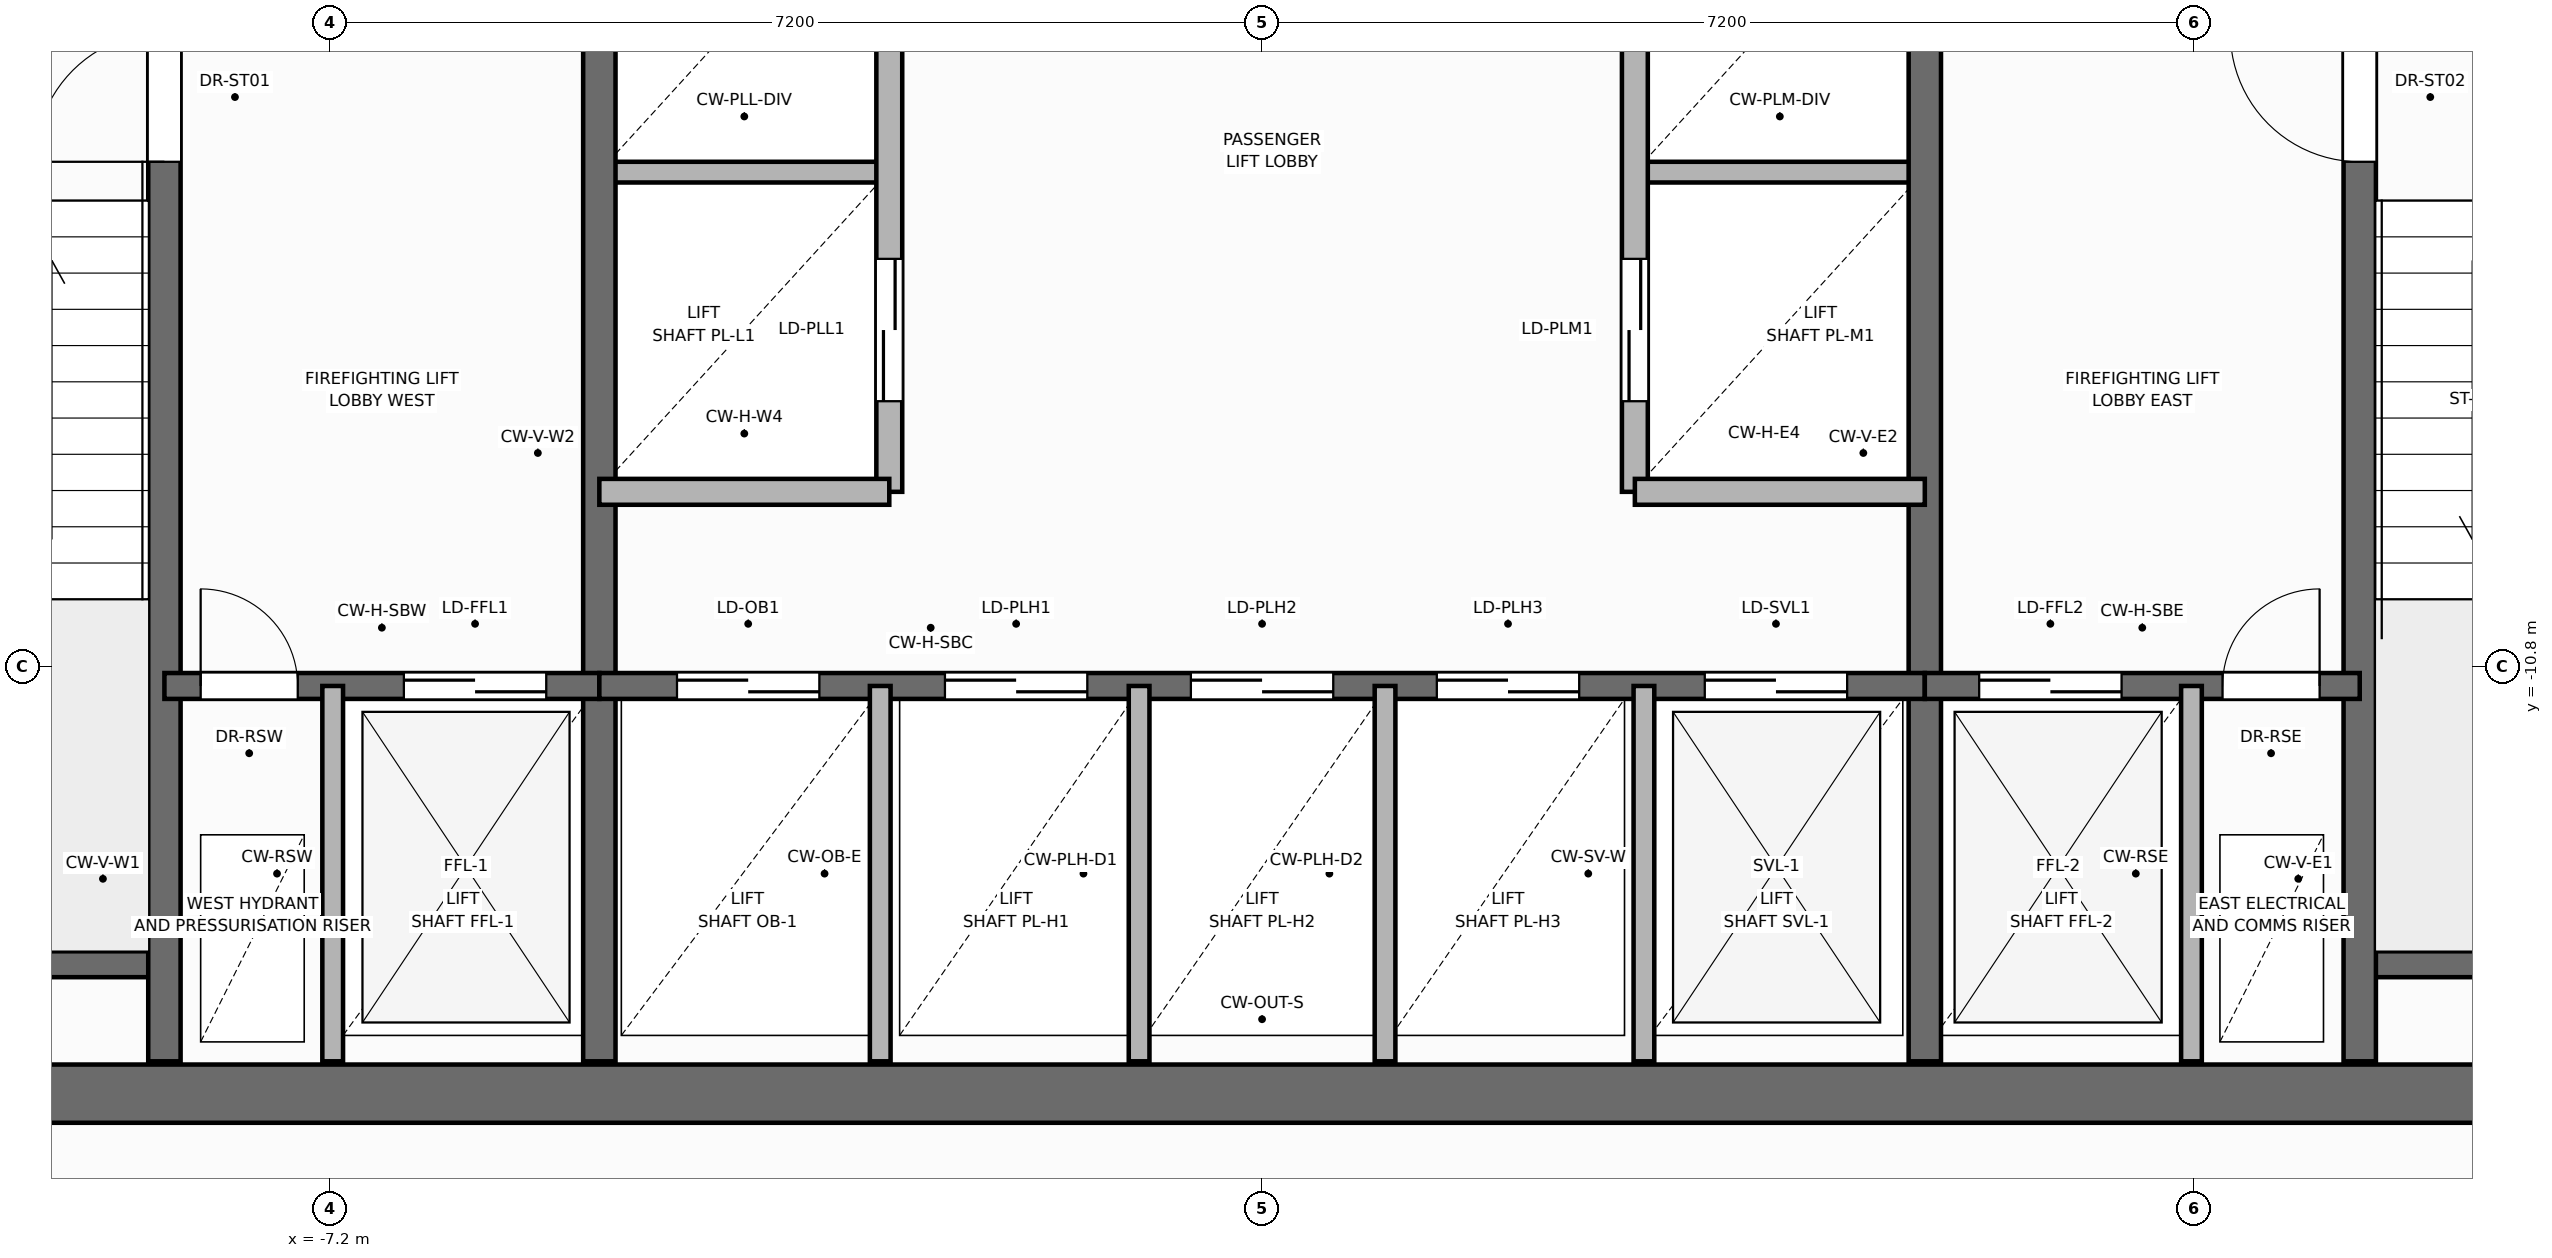
"""IFC4 building model, lengths in metres.
Left out: names, types, materials, properties, quantities, classifications, styles, units other than length and angle.
Written with IfcOpenShell. Run it as: python <this file> out.ifc"""

import sys

from ifc_helpers import new_model, si_unit, direction, frame, frame_2d, origin, place, context, subcontext, project, spatial, rectangle, extrude, element, fill, save


model = new_model("IFC4")
c1 = context("Model", 3, precision=1e-05, world=origin(), true_north=direction((0.0, 1.0)))
c2 = subcontext(c1, "Body", "Model", "MODEL_VIEW")
j1 = project(units=[si_unit("LENGTHUNIT", "METRE"), si_unit("PLANEANGLEUNIT", "RADIAN")], contexts=[c1])
p1 = place(None, origin())
s1 = spatial("IfcSite", under=j1, at=p1, CompositionType="ELEMENT")
p2 = place(p1, origin())
s2 = spatial("IfcBuilding", under=s1, at=p2, CompositionType="ELEMENT")
p3 = place(p2, frame((0.0, 0.0, 9.9)))
s3 = spatial("IfcBuildingStorey", under=s2, at=p3, CompositionType="ELEMENT", Elevation=9.9)
for number, where, z_axis, x_axis in (
    (1, (-5.12, -6.98, 0.0), (0.0, 0.0, 1.0), (1.0, 0.0, 0.0)),
    (2, (2.88, -6.98, 0.0), (0.0, 0.0, 1.0), (1.0, 0.0, 0.0)),
):
    element("IfcWall", number, at=place(p3, frame(where, z_axis=z_axis, x_axis=x_axis)), inside=s3, PredefinedType="PARTITIONING", context=c2, shape_type="SweptSolid", body=[
        extrude(rectangle(XDim=2.24, YDim=0.16, at=frame_2d((1.12, 0.0))), origin(), (0.0, 0.0, 1.0), 4.22),
    ])
p4 = place(p3, frame((-12.65, -14.1, 0.0), z_axis=(0.0, 0.0, 1.0), x_axis=(1.0, 0.0, 0.0)))
e3 = element("IfcWall", 3, at=p4, inside=s3, PredefinedType="SHEAR", context=c2, shape_type="SweptSolid", body=[
    extrude(rectangle(XDim=25.3, YDim=0.45, at=frame_2d((12.65, 0.0))), origin(), (0.0, 0.0, 1.0), 4.5),
])
for number, where, z_axis, x_axis in (
    (4, (-12.35, -13.1, 0.0), (0.0, 0.0, 1.0), (1.0, 0.0, 0.0)),
    (5, (8.48, -13.1, 0.0), (0.0, 0.0, 1.0), (1.0, 0.0, 0.0)),
):
    element("IfcWall", number, at=place(p3, frame(where, z_axis=z_axis, x_axis=x_axis)), inside=s3, PredefinedType="SOLIDWALL", context=c2, shape_type="SweptSolid", body=[
        extrude(rectangle(XDim=3.87, YDim=0.2, at=frame_2d((1.935, 0.0))), origin(), (0.0, 0.0, 1.0), 4.5),
    ])
p5 = place(p3, frame((-8.48, -13.85, 0.0), z_axis=(0.0, 0.0, 1.0), x_axis=(0.0, 1.0, 0.0)))
e6 = element("IfcWall", 6, at=p5, inside=s3, PredefinedType="SHEAR", context=c2, shape_type="SweptSolid", body=[
    extrude(rectangle(XDim=9.4, YDim=0.25, at=frame_2d((4.7, 0.0))), origin(), (0.0, 0.0, 1.0), 4.5),
])
p6 = place(p5, frame((6.95, 0.0, 0.0)))
e7 = element("IfcOpeningElement", 7, at=p6, cuts=e6, PredefinedType="OPENING", context=c2, shape_type="SweptSolid", body=[
    extrude(rectangle(XDim=1.006, YDim=2.104, at=frame_2d((0.5, 1.052))), frame((0.0, 0.135, 0.0), z_axis=(0.0, -1.0, 0.0), x_axis=(1.0, 0.0, 0.0)), (0.0, 0.0, 1.0), 0.27),
])
p7 = place(p3, frame((8.48, -13.85, 0.0), z_axis=(0.0, 0.0, 1.0), x_axis=(0.0, 1.0, 0.0)))
e8 = element("IfcWall", 8, at=p7, inside=s3, PredefinedType="SHEAR", context=c2, shape_type="SweptSolid", body=[
    extrude(rectangle(XDim=9.4, YDim=0.25, at=frame_2d((4.7, 0.0))), origin(), (0.0, 0.0, 1.0), 4.5),
])
p8 = place(p7, frame((6.95, 0.0, 0.0)))
e9 = element("IfcOpeningElement", 9, at=p8, cuts=e8, PredefinedType="OPENING", context=c2, shape_type="SweptSolid", body=[
    extrude(rectangle(XDim=1.006, YDim=2.104, at=frame_2d((0.5, 1.052))), frame((0.0, 0.135, 0.0), z_axis=(0.0, -1.0, 0.0), x_axis=(1.0, 0.0, 0.0)), (0.0, 0.0, 1.0), 0.27),
])
for number, where, z_axis, x_axis in (
    (10, (-5.12, -13.85, 0.0), (0.0, 0.0, 1.0), (0.0, 1.0, 0.0)),
    (11, (5.12, -13.85, 0.0), (0.0, 0.0, 1.0), (0.0, 1.0, 0.0)),
):
    element("IfcWall", number, at=place(p3, frame(where, z_axis=z_axis, x_axis=x_axis)), inside=s3, PredefinedType="SHEAR", context=c2, shape_type="SweptSolid", body=[
        extrude(rectangle(XDim=9.4, YDim=0.25, at=frame_2d((4.7, 0.0))), origin(), (0.0, 0.0, 1.0), 4.5),
    ])
p9 = place(p3, frame((-8.48, -10.95, 0.0), z_axis=(0.0, 0.0, 1.0), x_axis=(1.0, 0.0, 0.0)))
e12 = element("IfcWall", 12, at=p9, inside=s3, PredefinedType="SOLIDWALL", context=c2, shape_type="SweptSolid", body=[
    extrude(rectangle(XDim=3.36, YDim=0.2, at=frame_2d((1.68, 0.0))), origin(), (0.0, 0.0, 1.0), 4.5),
])
p10 = place(p9, frame((0.28, 0.0, 0.0)))
e13 = element("IfcOpeningElement", 13, at=p10, cuts=e12, PredefinedType="OPENING", context=c2, shape_type="SweptSolid", body=[
    extrude(rectangle(XDim=0.756, YDim=2.054, at=frame_2d((0.375, 1.027))), frame((0.0, 0.11, 0.0), z_axis=(0.0, -1.0, 0.0), x_axis=(1.0, 0.0, 0.0)), (0.0, 0.0, 1.0), 0.22),
])
p11 = place(p9, frame((1.85, 0.0, 0.0)))
e14 = element("IfcOpeningElement", 14, at=p11, cuts=e12, PredefinedType="OPENING", context=c2, shape_type="SweptSolid", body=[
    extrude(rectangle(XDim=1.106, YDim=2.104, at=frame_2d((0.55, 1.052))), frame((0.0, 0.11, 0.0), z_axis=(0.0, -1.0, 0.0), x_axis=(1.0, 0.0, 0.0)), (0.0, 0.0, 1.0), 0.22),
])
p12 = place(p3, frame((-5.12, -10.95, 0.0), z_axis=(0.0, 0.0, 1.0), x_axis=(1.0, 0.0, 0.0)))
e15 = element("IfcWall", 15, at=p12, inside=s3, PredefinedType="SOLIDWALL", context=c2, shape_type="SweptSolid", body=[
    extrude(rectangle(XDim=10.24, YDim=0.2, at=frame_2d((5.12, 0.0))), origin(), (0.0, 0.0, 1.0), 4.5),
])
p13 = place(p12, frame((0.6, 0.0, 0.0)))
e16 = element("IfcOpeningElement", 16, at=p13, cuts=e15, PredefinedType="OPENING", context=c2, shape_type="SweptSolid", body=[
    extrude(rectangle(XDim=1.106, YDim=2.104, at=frame_2d((0.55, 1.052))), frame((0.0, 0.11, 0.0), z_axis=(0.0, -1.0, 0.0), x_axis=(1.0, 0.0, 0.0)), (0.0, 0.0, 1.0), 0.22),
])
p14 = place(p12, frame((2.67, 0.0, 0.0)))
e17 = element("IfcOpeningElement", 17, at=p14, cuts=e15, PredefinedType="OPENING", context=c2, shape_type="SweptSolid", body=[
    extrude(rectangle(XDim=1.106, YDim=2.104, at=frame_2d((0.55, 1.052))), frame((0.0, 0.11, 0.0), z_axis=(0.0, -1.0, 0.0), x_axis=(1.0, 0.0, 0.0)), (0.0, 0.0, 1.0), 0.22),
])
p15 = place(p12, frame((4.57, 0.0, 0.0)))
e18 = element("IfcOpeningElement", 18, at=p15, cuts=e15, PredefinedType="OPENING", context=c2, shape_type="SweptSolid", body=[
    extrude(rectangle(XDim=1.106, YDim=2.104, at=frame_2d((0.55, 1.052))), frame((0.0, 0.11, 0.0), z_axis=(0.0, -1.0, 0.0), x_axis=(1.0, 0.0, 0.0)), (0.0, 0.0, 1.0), 0.22),
])
p16 = place(p12, frame((6.47, 0.0, 0.0)))
e19 = element("IfcOpeningElement", 19, at=p16, cuts=e15, PredefinedType="OPENING", context=c2, shape_type="SweptSolid", body=[
    extrude(rectangle(XDim=1.106, YDim=2.104, at=frame_2d((0.55, 1.052))), frame((0.0, 0.11, 0.0), z_axis=(0.0, -1.0, 0.0), x_axis=(1.0, 0.0, 0.0)), (0.0, 0.0, 1.0), 0.22),
])
p17 = place(p12, frame((8.54, 0.0, 0.0)))
e20 = element("IfcOpeningElement", 20, at=p17, cuts=e15, PredefinedType="OPENING", context=c2, shape_type="SweptSolid", body=[
    extrude(rectangle(XDim=1.106, YDim=2.104, at=frame_2d((0.55, 1.052))), frame((0.0, 0.11, 0.0), z_axis=(0.0, -1.0, 0.0), x_axis=(1.0, 0.0, 0.0)), (0.0, 0.0, 1.0), 0.22),
])
p18 = place(p3, frame((5.12, -10.95, 0.0), z_axis=(0.0, 0.0, 1.0), x_axis=(1.0, 0.0, 0.0)))
e21 = element("IfcWall", 21, at=p18, inside=s3, PredefinedType="SOLIDWALL", context=c2, shape_type="SweptSolid", body=[
    extrude(rectangle(XDim=3.36, YDim=0.2, at=frame_2d((1.68, 0.0))), origin(), (0.0, 0.0, 1.0), 4.5),
])
p19 = place(p18, frame((0.42, 0.0, 0.0)))
e22 = element("IfcOpeningElement", 22, at=p19, cuts=e21, PredefinedType="OPENING", context=c2, shape_type="SweptSolid", body=[
    extrude(rectangle(XDim=1.106, YDim=2.104, at=frame_2d((0.55, 1.052))), frame((0.0, 0.11, 0.0), z_axis=(0.0, -1.0, 0.0), x_axis=(1.0, 0.0, 0.0)), (0.0, 0.0, 1.0), 0.22),
])
p20 = place(p18, frame((2.3, 0.0, 0.0)))
e23 = element("IfcOpeningElement", 23, at=p20, cuts=e21, PredefinedType="OPENING", context=c2, shape_type="SweptSolid", body=[
    extrude(rectangle(XDim=0.756, YDim=2.054, at=frame_2d((0.375, 1.027))), frame((0.0, 0.11, 0.0), z_axis=(0.0, -1.0, 0.0), x_axis=(1.0, 0.0, 0.0)), (0.0, 0.0, 1.0), 0.22),
])
for number, where, z_axis, x_axis in (
    (24, (-7.18, -13.85, 0.0), (0.0, 0.0, 1.0), (0.0, 1.0, 0.0)),
    (25, (7.18, -13.85, 0.0), (0.0, 0.0, 1.0), (0.0, 1.0, 0.0)),
    (26, (-2.95, -13.85, 0.0), (0.0, 0.0, 1.0), (0.0, 1.0, 0.0)),
    (27, (2.95, -13.85, 0.0), (0.0, 0.0, 1.0), (0.0, 1.0, 0.0)),
):
    element("IfcWall", number, at=place(p3, frame(where, z_axis=z_axis, x_axis=x_axis)), inside=s3, PredefinedType="PARTITIONING", context=c2, shape_type="SweptSolid", body=[
        extrude(rectangle(XDim=2.9, YDim=0.16, at=frame_2d((1.45, 0.0))), origin(), (0.0, 0.0, 1.0), 3.245),
    ])
p21 = place(p3, frame((-2.88, -9.45, 0.0), z_axis=(0.0, 0.0, 1.0), x_axis=(0.0, 1.0, 0.0)))
e28 = element("IfcWall", 28, at=p21, inside=s3, PredefinedType="SOLIDWALL", context=c2, shape_type="SweptSolid", body=[
    extrude(rectangle(XDim=5.0, YDim=0.2, at=frame_2d((2.5, 0.0))), origin(), (0.0, 0.0, 1.0), 4.22),
])
p22 = place(p21, frame((0.7, 0.0, 0.0)))
e29 = element("IfcOpeningElement", 29, at=p22, cuts=e28, PredefinedType="OPENING", context=c2, shape_type="SweptSolid", body=[
    extrude(rectangle(XDim=1.106, YDim=2.104, at=frame_2d((0.55, 1.052))), frame((0.0, 0.11, 0.0), z_axis=(0.0, -1.0, 0.0), x_axis=(1.0, 0.0, 0.0)), (0.0, 0.0, 1.0), 0.22),
])
p23 = place(p3, frame((-5.12, -9.45, 0.0), z_axis=(0.0, 0.0, 1.0), x_axis=(1.0, 0.0, 0.0)))
e30 = element("IfcWall", 30, at=p23, inside=s3, PredefinedType="SOLIDWALL", context=c2, shape_type="SweptSolid", body=[
    extrude(rectangle(XDim=2.24, YDim=0.2, at=frame_2d((1.12, 0.0))), origin(), (0.0, 0.0, 1.0), 4.22),
])
p24 = place(p3, frame((2.88, -9.45, 0.0), z_axis=(0.0, 0.0, 1.0), x_axis=(0.0, 1.0, 0.0)))
e31 = element("IfcWall", 31, at=p24, inside=s3, PredefinedType="SOLIDWALL", context=c2, shape_type="SweptSolid", body=[
    extrude(rectangle(XDim=5.0, YDim=0.2, at=frame_2d((2.5, 0.0))), origin(), (0.0, 0.0, 1.0), 4.22),
])
p25 = place(p24, frame((0.7, 0.0, 0.0)))
e32 = element("IfcOpeningElement", 32, at=p25, cuts=e31, PredefinedType="OPENING", context=c2, shape_type="SweptSolid", body=[
    extrude(rectangle(XDim=1.106, YDim=2.104, at=frame_2d((0.55, 1.052))), frame((0.0, 0.11, 0.0), z_axis=(0.0, -1.0, 0.0), x_axis=(1.0, 0.0, 0.0)), (0.0, 0.0, 1.0), 0.22),
])
p26 = place(p3, frame((2.88, -9.45, 0.0), z_axis=(0.0, 0.0, 1.0), x_axis=(1.0, 0.0, 0.0)))
e33 = element("IfcWall", 33, at=p26, inside=s3, PredefinedType="SOLIDWALL", context=c2, shape_type="SweptSolid", body=[
    extrude(rectangle(XDim=2.24, YDim=0.2, at=frame_2d((1.12, 0.0))), origin(), (0.0, 0.0, 1.0), 4.22),
])
for number, where, z_axis, x_axis in (
    (34, (-0.95, -13.85, 0.0), (0.0, 0.0, 1.0), (0.0, 1.0, 0.0)),
    (35, (0.95, -13.85, 0.0), (0.0, 0.0, 1.0), (0.0, 1.0, 0.0)),
):
    element("IfcWall", number, at=place(p3, frame(where, z_axis=z_axis, x_axis=x_axis)), inside=s3, PredefinedType="PARTITIONING", context=c2, shape_type="SweptSolid", body=[
        extrude(rectangle(XDim=2.9, YDim=0.16, at=frame_2d((1.45, 0.0))), origin(), (0.0, 0.0, 1.0), 3.245),
    ])
p27 = place(p22, origin())
e36 = element("IfcDoor", 36, at=p27, inside=s3, OperationType="DOUBLE_DOOR_SLIDING", PredefinedType="DOOR", context=c2, shape_type="SweptSolid", body=[
    extrude(rectangle(XDim=1.1, YDim=2.1, at=frame_2d((0.55, 1.05))), frame((0.0, 0.025, 0.0), z_axis=(0.0, -1.0, 0.0), x_axis=(1.0, 0.0, 0.0)), (0.0, 0.0, 1.0), 0.05),
])
fill(e29, e36)
p28 = place(p25, origin())
e37 = element("IfcDoor", 37, at=p28, inside=s3, OperationType="DOUBLE_DOOR_SLIDING", PredefinedType="DOOR", context=c2, shape_type="SweptSolid", body=[
    extrude(rectangle(XDim=1.1, YDim=2.1, at=frame_2d((0.55, 1.05))), frame((0.0, 0.025, 0.0), z_axis=(0.0, -1.0, 0.0), x_axis=(1.0, 0.0, 0.0)), (0.0, 0.0, 1.0), 0.05),
])
fill(e32, e37)
p29 = place(p6, origin())
e38 = element("IfcDoor", 38, at=p29, inside=s3, OperationType="SINGLE_SWING_LEFT", PredefinedType="DOOR", context=c2, shape_type="SweptSolid", body=[
    extrude(rectangle(XDim=1.0, YDim=2.1, at=frame_2d((0.5, 1.05))), frame((0.0, 0.025, 0.0), z_axis=(0.0, -1.0, 0.0), x_axis=(1.0, 0.0, 0.0)), (0.0, 0.0, 1.0), 0.05),
])
fill(e7, e38)
p30 = place(p8, origin())
e39 = element("IfcDoor", 39, at=p30, inside=s3, OperationType="SINGLE_SWING_RIGHT", PredefinedType="DOOR", context=c2, shape_type="SweptSolid", body=[
    extrude(rectangle(XDim=1.0, YDim=2.1, at=frame_2d((0.5, 1.05))), frame((0.0, 0.025, 0.0), z_axis=(0.0, -1.0, 0.0), x_axis=(1.0, 0.0, 0.0)), (0.0, 0.0, 1.0), 0.05),
])
fill(e9, e39)
p31 = place(p10, origin())
e40 = element("IfcDoor", 40, at=p31, inside=s3, OperationType="SINGLE_SWING_LEFT", PredefinedType="DOOR", context=c2, shape_type="SweptSolid", body=[
    extrude(rectangle(XDim=0.75, YDim=2.05, at=frame_2d((0.375, 1.025))), frame((0.0, 0.025, 0.0), z_axis=(0.0, -1.0, 0.0), x_axis=(1.0, 0.0, 0.0)), (0.0, 0.0, 1.0), 0.05),
])
fill(e13, e40)
p32 = place(p11, origin())
e41 = element("IfcDoor", 41, at=p32, inside=s3, OperationType="DOUBLE_DOOR_SLIDING", PredefinedType="DOOR", context=c2, shape_type="SweptSolid", body=[
    extrude(rectangle(XDim=1.1, YDim=2.1, at=frame_2d((0.55, 1.05))), frame((0.0, 0.025, 0.0), z_axis=(0.0, -1.0, 0.0), x_axis=(1.0, 0.0, 0.0)), (0.0, 0.0, 1.0), 0.05),
])
fill(e14, e41)
p33 = place(p19, origin())
e42 = element("IfcDoor", 42, at=p33, inside=s3, OperationType="DOUBLE_DOOR_SLIDING", PredefinedType="DOOR", context=c2, shape_type="SweptSolid", body=[
    extrude(rectangle(XDim=1.1, YDim=2.1, at=frame_2d((0.55, 1.05))), frame((0.0, 0.025, 0.0), z_axis=(0.0, -1.0, 0.0), x_axis=(1.0, 0.0, 0.0)), (0.0, 0.0, 1.0), 0.05),
])
fill(e22, e42)
p34 = place(p20, origin())
e43 = element("IfcDoor", 43, at=p34, inside=s3, OperationType="SINGLE_SWING_RIGHT", PredefinedType="DOOR", context=c2, shape_type="SweptSolid", body=[
    extrude(rectangle(XDim=0.75, YDim=2.05, at=frame_2d((0.375, 1.025))), frame((0.0, 0.025, 0.0), z_axis=(0.0, -1.0, 0.0), x_axis=(1.0, 0.0, 0.0)), (0.0, 0.0, 1.0), 0.05),
])
fill(e23, e43)
p35 = place(p13, origin())
e44 = element("IfcDoor", 44, at=p35, inside=s3, OperationType="DOUBLE_DOOR_SLIDING", PredefinedType="DOOR", context=c2, shape_type="SweptSolid", body=[
    extrude(rectangle(XDim=1.1, YDim=2.1, at=frame_2d((0.55, 1.05))), frame((0.0, 0.025, 0.0), z_axis=(0.0, -1.0, 0.0), x_axis=(1.0, 0.0, 0.0)), (0.0, 0.0, 1.0), 0.05),
])
fill(e16, e44)
p36 = place(p14, origin())
e45 = element("IfcDoor", 45, at=p36, inside=s3, OperationType="DOUBLE_DOOR_SLIDING", PredefinedType="DOOR", context=c2, shape_type="SweptSolid", body=[
    extrude(rectangle(XDim=1.1, YDim=2.1, at=frame_2d((0.55, 1.05))), frame((0.0, 0.025, 0.0), z_axis=(0.0, -1.0, 0.0), x_axis=(1.0, 0.0, 0.0)), (0.0, 0.0, 1.0), 0.05),
])
fill(e17, e45)
p37 = place(p15, origin())
e46 = element("IfcDoor", 46, at=p37, inside=s3, OperationType="DOUBLE_DOOR_SLIDING", PredefinedType="DOOR", context=c2, shape_type="SweptSolid", body=[
    extrude(rectangle(XDim=1.1, YDim=2.1, at=frame_2d((0.55, 1.05))), frame((0.0, 0.025, 0.0), z_axis=(0.0, -1.0, 0.0), x_axis=(1.0, 0.0, 0.0)), (0.0, 0.0, 1.0), 0.05),
])
fill(e18, e46)
p38 = place(p16, origin())
e47 = element("IfcDoor", 47, at=p38, inside=s3, OperationType="DOUBLE_DOOR_SLIDING", PredefinedType="DOOR", context=c2, shape_type="SweptSolid", body=[
    extrude(rectangle(XDim=1.1, YDim=2.1, at=frame_2d((0.55, 1.05))), frame((0.0, 0.025, 0.0), z_axis=(0.0, -1.0, 0.0), x_axis=(1.0, 0.0, 0.0)), (0.0, 0.0, 1.0), 0.05),
])
fill(e19, e47)
p39 = place(p17, origin())
e48 = element("IfcDoor", 48, at=p39, inside=s3, OperationType="DOUBLE_DOOR_SLIDING", PredefinedType="DOOR", context=c2, shape_type="SweptSolid", body=[
    extrude(rectangle(XDim=1.1, YDim=2.1, at=frame_2d((0.55, 1.05))), frame((0.0, 0.025, 0.0), z_axis=(0.0, -1.0, 0.0), x_axis=(1.0, 0.0, 0.0)), (0.0, 0.0, 1.0), 0.05),
])
fill(e20, e48)
save(model, sys.argv[1])
